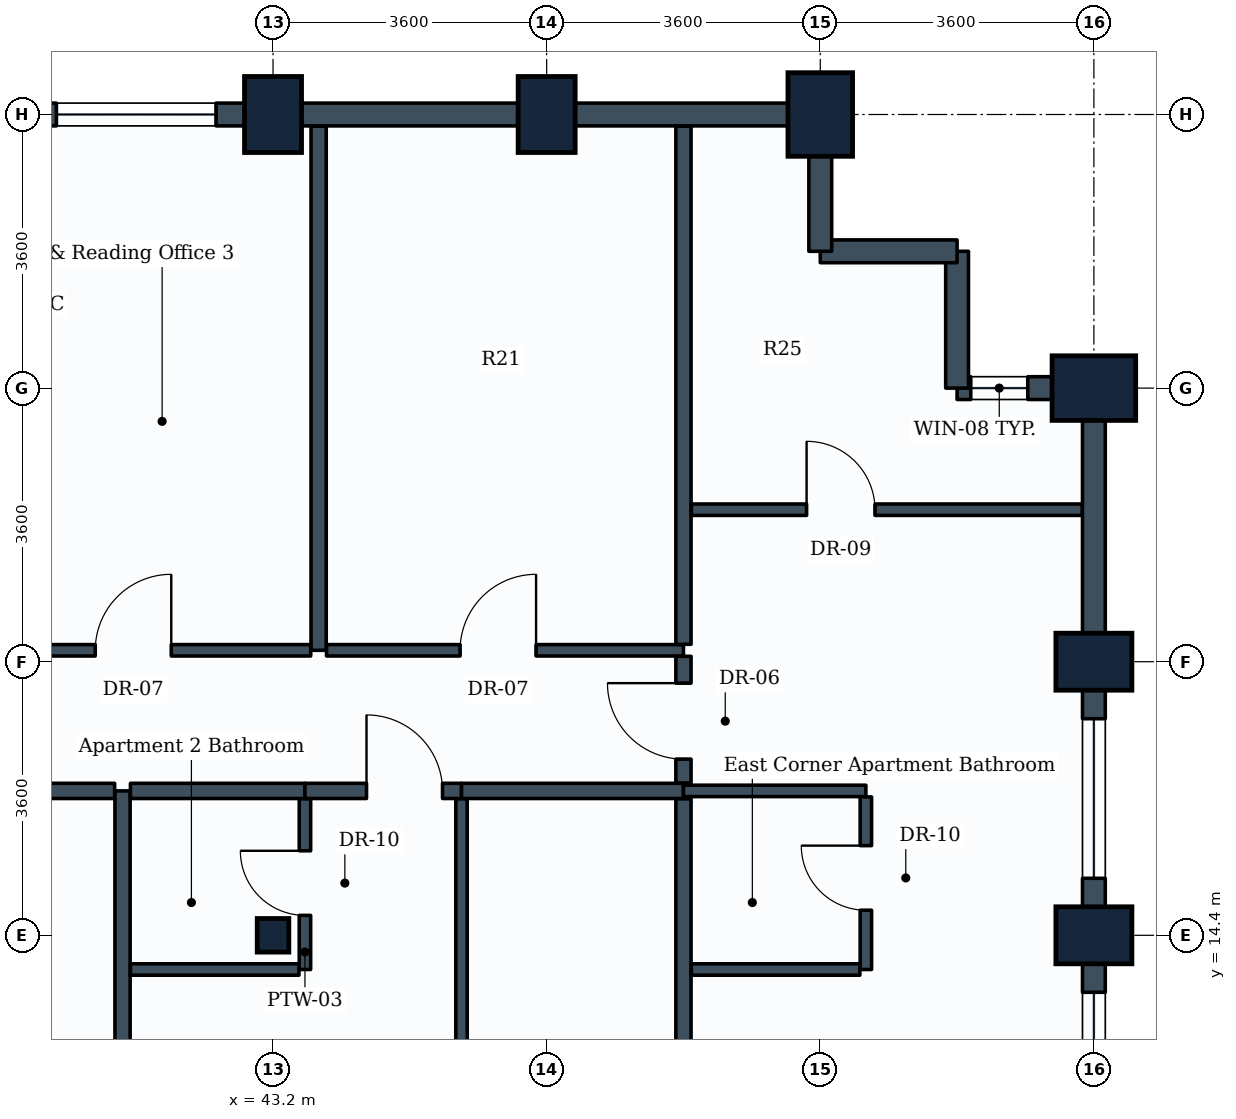
"""IFC4 building model, lengths in metres.
Left out: names, types, materials, properties, quantities, classifications, styles, units other than length and angle.
Written with IfcOpenShell. Run it as: python <this file> out.ifc"""

import sys

from ifc_helpers import new_model, si_unit, direction, frame, frame_2d, origin, origin_2d, place, context, subcontext, project, spatial, rectangle, i_section, extrude, element, fill, save


model = new_model("IFC4")
c1 = context("Model", 3, precision=1e-05, world=origin(), true_north=direction((0.0, 1.0)))
c2 = subcontext(c1, "Body", "Model", "MODEL_VIEW")
j1 = project(units=[si_unit("LENGTHUNIT", "METRE"), si_unit("PLANEANGLEUNIT", "RADIAN")], contexts=[c1])
p1 = place(None, origin())
s1 = spatial("IfcSite", under=j1, at=p1, CompositionType="ELEMENT")
p2 = place(p1, origin())
s2 = spatial("IfcBuilding", under=s1, at=p2, CompositionType="ELEMENT")
p3 = place(p2, frame((0.0, 0.0, 139.0)))
s3 = spatial("IfcBuildingStorey", under=s2, at=p3, CompositionType="ELEMENT", Elevation=139.0)
p4 = place(p3, frame((43.2, 14.4, 0.0), z_axis=(0.0, 0.0, 1.0), x_axis=(1.0, 0.0, 0.0)))
e1 = element("IfcColumn", 1, at=p4, inside=s3, PredefinedType="COLUMN", context=c2, shape_type="SweptSolid", body=[
    extrude(i_section(OverallWidth=0.416, OverallDepth=0.442, WebThickness=0.025, FlangeThickness=0.041, FilletRadius=0.015, at=origin_2d()), origin(), (0.0, 0.0, 1.0), 3.8),
])
for number, where, z_axis, x_axis in (
    (2, (43.2, 25.2, 0.0), (0.0, 0.0, 1.0), (1.0, 0.0, 0.0)),
    (3, (46.8, 25.2, 0.0), (0.0, 0.0, 1.0), (1.0, 0.0, 0.0)),
):
    element("IfcColumn", number, at=place(p3, frame(where, z_axis=z_axis, x_axis=x_axis)), inside=s3, PredefinedType="COLUMN", context=c2, shape_type="SweptSolid", body=[
        extrude(rectangle(XDim=0.75, YDim=1.0, at=origin_2d()), origin(), (0.0, 0.0, 1.0), 3.8),
    ])
p5 = place(p3, frame((50.4, 25.2, 0.0), z_axis=(0.0, 0.0, 1.0), x_axis=(1.0, 0.0, 0.0)))
e4 = element("IfcColumn", 4, at=p5, inside=s3, PredefinedType="COLUMN", context=c2, shape_type="SweptSolid", body=[
    extrude(rectangle(XDim=0.85, YDim=1.1, at=origin_2d()), origin(), (0.0, 0.0, 1.0), 3.8),
])
for number, where, z_axis, x_axis in (
    (5, (54.0, 14.4, 0.0), (0.0, 0.0, 1.0), (0.0, 1.0, 0.0)),
    (6, (54.0, 18.0, 0.0), (0.0, 0.0, 1.0), (0.0, 1.0, 0.0)),
):
    element("IfcColumn", number, at=place(p3, frame(where, z_axis=z_axis, x_axis=x_axis)), inside=s3, PredefinedType="COLUMN", context=c2, shape_type="SweptSolid", body=[
        extrude(rectangle(XDim=0.75, YDim=1.0, at=origin_2d()), origin(), (0.0, 0.0, 1.0), 3.8),
    ])
p6 = place(p3, frame((54.0, 21.6, 0.0), z_axis=(0.0, 0.0, 1.0), x_axis=(0.0, 1.0, 0.0)))
e7 = element("IfcColumn", 7, at=p6, inside=s3, PredefinedType="COLUMN", context=c2, shape_type="SweptSolid", body=[
    extrude(rectangle(XDim=0.85, YDim=1.1, at=origin_2d()), origin(), (0.0, 0.0, 1.0), 3.8),
])
p7 = place(p3, frame((54.0, 14.4, 0.0), z_axis=(0.0, 0.0, 1.0), x_axis=(0.0, -1.0, 0.0)))
e8 = element("IfcWall", 8, at=p7, inside=s3, PredefinedType="STANDARD", context=c2, shape_type="SweptSolid", body=[
    extrude(rectangle(XDim=3.6, YDim=0.3, at=frame_2d((1.8, 0.0))), origin(), (0.0, 0.0, 1.0), 2.93),
])
p8 = place(p7, frame((0.75, 0.0, 0.85)))
e9 = element("IfcOpeningElement", 9, at=p8, cuts=e8, PredefinedType="OPENING", context=c2, shape_type="SweptSolid", body=[
    extrude(rectangle(XDim=2.1, YDim=1.35, at=frame_2d((1.05, 0.675))), frame((0.0, 0.16, 0.0), z_axis=(0.0, -1.0, 0.0), x_axis=(1.0, 0.0, 0.0)), (0.0, 0.0, 1.0), 0.32),
])
p9 = place(p3, frame((54.0, 18.0, 0.0), z_axis=(0.0, 0.0, 1.0), x_axis=(0.0, -1.0, 0.0)))
e10 = element("IfcWall", 10, at=p9, inside=s3, PredefinedType="STANDARD", context=c2, shape_type="SweptSolid", body=[
    extrude(rectangle(XDim=3.6, YDim=0.3, at=frame_2d((1.8, 0.0))), origin(), (0.0, 0.0, 1.0), 2.93),
])
p10 = place(p9, frame((0.75, 0.0, 0.85)))
e11 = element("IfcOpeningElement", 11, at=p10, cuts=e10, PredefinedType="OPENING", context=c2, shape_type="SweptSolid", body=[
    extrude(rectangle(XDim=2.1, YDim=1.35, at=frame_2d((1.05, 0.675))), frame((0.0, 0.16, 0.0), z_axis=(0.0, -1.0, 0.0), x_axis=(1.0, 0.0, 0.0)), (0.0, 0.0, 1.0), 0.32),
])
p11 = place(p3, frame((54.0, 21.6, 0.0), z_axis=(0.0, 0.0, 1.0), x_axis=(0.0, -1.0, 0.0)))
e12 = element("IfcWall", 12, at=p11, inside=s3, PredefinedType="STANDARD", context=c2, shape_type="SweptSolid", body=[
    extrude(rectangle(XDim=3.6, YDim=0.3, at=frame_2d((1.8, 0.0))), origin(), (0.0, 0.0, 1.0), 2.93),
])
p12 = place(p3, frame((52.2, 21.6, 0.0), z_axis=(0.0, 0.0, 1.0), x_axis=(1.0, 0.0, 0.0)))
e13 = element("IfcWall", 13, at=p12, inside=s3, PredefinedType="STANDARD", context=c2, shape_type="SweptSolid", body=[
    extrude(rectangle(XDim=1.8, YDim=0.3, at=frame_2d((0.9, 0.0))), origin(), (0.0, 0.0, 1.0), 2.93),
])
p13 = place(p12, frame((0.18, 0.0, 0.85)))
e14 = element("IfcOpeningElement", 14, at=p13, cuts=e13, PredefinedType="OPENING", context=c2, shape_type="SweptSolid", body=[
    extrude(rectangle(XDim=0.75, YDim=1.05, at=frame_2d((0.375, 0.525))), frame((0.0, 0.16, 0.0), z_axis=(0.0, -1.0, 0.0), x_axis=(1.0, 0.0, 0.0)), (0.0, 0.0, 1.0), 0.32),
])
p14 = place(p3, frame((52.2, 23.4, 0.0), z_axis=(0.0, 0.0, 1.0), x_axis=(0.0, -1.0, 0.0)))
e15 = element("IfcWall", 15, at=p14, inside=s3, PredefinedType="STANDARD", context=c2, shape_type="SweptSolid", body=[
    extrude(rectangle(XDim=1.8, YDim=0.3, at=frame_2d((0.9, 0.0))), origin(), (0.0, 0.0, 1.0), 3.535),
])
p15 = place(p3, frame((50.4, 23.4, 0.0), z_axis=(0.0, 0.0, 1.0), x_axis=(1.0, 0.0, 0.0)))
e16 = element("IfcWall", 16, at=p15, inside=s3, PredefinedType="STANDARD", context=c2, shape_type="SweptSolid", body=[
    extrude(rectangle(XDim=1.8, YDim=0.3, at=frame_2d((0.9, 0.0))), origin(), (0.0, 0.0, 1.0), 3.535),
])
p16 = place(p3, frame((50.4, 25.2, 0.0), z_axis=(0.0, 0.0, 1.0), x_axis=(0.0, -1.0, 0.0)))
e17 = element("IfcWall", 17, at=p16, inside=s3, PredefinedType="STANDARD", context=c2, shape_type="SweptSolid", body=[
    extrude(rectangle(XDim=1.8, YDim=0.3, at=frame_2d((0.9, 0.0))), origin(), (0.0, 0.0, 1.0), 2.93),
])
p17 = place(p3, frame((46.8, 25.2, 0.0), z_axis=(0.0, 0.0, 1.0), x_axis=(1.0, 0.0, 0.0)))
e18 = element("IfcWall", 18, at=p17, inside=s3, PredefinedType="STANDARD", context=c2, shape_type="SweptSolid", body=[
    extrude(rectangle(XDim=3.6, YDim=0.3, at=frame_2d((1.8, 0.0))), origin(), (0.0, 0.0, 1.0), 2.93),
])
p18 = place(p3, frame((43.2, 25.2, 0.0), z_axis=(0.0, 0.0, 1.0), x_axis=(1.0, 0.0, 0.0)))
e19 = element("IfcWall", 19, at=p18, inside=s3, PredefinedType="STANDARD", context=c2, shape_type="SweptSolid", body=[
    extrude(rectangle(XDim=3.6, YDim=0.3, at=frame_2d((1.8, 0.0))), origin(), (0.0, 0.0, 1.0), 2.93),
])
p19 = place(p3, frame((39.6, 25.2, 0.0), z_axis=(0.0, 0.0, 1.0), x_axis=(1.0, 0.0, 0.0)))
e20 = element("IfcWall", 20, at=p19, inside=s3, PredefinedType="STANDARD", context=c2, shape_type="SweptSolid", body=[
    extrude(rectangle(XDim=3.6, YDim=0.3, at=frame_2d((1.8, 0.0))), origin(), (0.0, 0.0, 1.0), 2.93),
])
p20 = place(p19, frame((0.75, 0.0, 0.85)))
e21 = element("IfcOpeningElement", 21, at=p20, cuts=e20, PredefinedType="OPENING", context=c2, shape_type="SweptSolid", body=[
    extrude(rectangle(XDim=2.1, YDim=1.35, at=frame_2d((1.05, 0.675))), frame((0.0, 0.16, 0.0), z_axis=(0.0, -1.0, 0.0), x_axis=(1.0, 0.0, 0.0)), (0.0, 0.0, 1.0), 0.32),
])
p21 = place(p3, frame((41.22, 5.7, 0.0), z_axis=(0.0, 0.0, 1.0), x_axis=(0.0, 1.0, 0.0)))
e22 = element("IfcWall", 22, at=p21, inside=s3, PredefinedType="PARTITIONING", context=c2, shape_type="SweptSolid", body=[
    extrude(rectangle(XDim=10.6, YDim=0.2, at=frame_2d((5.3, 0.0))), origin(), (0.0, 0.0, 1.0), 3.13),
])
p22 = place(p3, frame((36.8, 16.3, 0.0), z_axis=(0.0, 0.0, 1.0), x_axis=(1.0, 0.0, 0.0)))
e23 = element("IfcWall", 23, at=p22, inside=s3, PredefinedType="PARTITIONING", context=c2, shape_type="SweptSolid", body=[
    extrude(rectangle(XDim=4.316, YDim=0.2, at=frame_2d((2.158, 0.0))), origin(), (0.0, 0.0, 1.0), 3.17),
])
p23 = place(p22, frame((1.71, 0.0, 0.0)))
e24 = element("IfcOpeningElement", 24, at=p23, cuts=e23, PredefinedType="OPENING", context=c2, shape_type="SweptSolid", body=[
    extrude(rectangle(XDim=1.0, YDim=2.1, at=frame_2d((0.5, 1.05))), frame((0.0, 0.11, 0.0), z_axis=(0.0, -1.0, 0.0), x_axis=(1.0, 0.0, 0.0)), (0.0, 0.0, 1.0), 0.22),
])
p24 = place(p3, frame((41.324, 16.3, 0.0), z_axis=(0.0, 0.0, 1.0), x_axis=(1.0, 0.0, 0.0)))
e25 = element("IfcWall", 25, at=p24, inside=s3, PredefinedType="PARTITIONING", context=c2, shape_type="SweptSolid", body=[
    extrude(rectangle(XDim=2.296, YDim=0.2, at=frame_2d((1.148, 0.0))), origin(), (0.0, 0.0, 1.0), 3.18),
])
p25 = place(p3, frame((43.62, 13.95, 0.0), z_axis=(0.0, 0.0, 1.0), x_axis=(0.0, 1.0, 0.0)))
e26 = element("IfcWall", 26, at=p25, inside=s3, PredefinedType="PARTITIONING", context=c2, shape_type="SweptSolid", body=[
    extrude(rectangle(XDim=2.246, YDim=0.15, at=frame_2d((1.123, 0.0))), origin(), (0.0, 0.0, 1.0), 3.17),
])
p26 = place(p25, frame((0.712, 0.0, 0.0)))
e27 = element("IfcOpeningElement", 27, at=p26, cuts=e26, PredefinedType="OPENING", context=c2, shape_type="SweptSolid", body=[
    extrude(rectangle(XDim=0.85, YDim=2.1, at=frame_2d((0.425, 1.05))), frame((0.0, 0.085, 0.0), z_axis=(0.0, -1.0, 0.0), x_axis=(1.0, 0.0, 0.0)), (0.0, 0.0, 1.0), 0.17),
])
p27 = place(p3, frame((41.324, 13.95, 0.0), z_axis=(0.0, 0.0, 1.0), x_axis=(1.0, 0.0, 0.0)))
e28 = element("IfcWall", 28, at=p27, inside=s3, PredefinedType="PARTITIONING", context=c2, shape_type="SweptSolid", body=[
    extrude(rectangle(XDim=2.217, YDim=0.15, at=frame_2d((1.108, 0.0))), origin(), (0.0, 0.0, 1.0), 3.18),
])
p28 = place(p3, frame((43.62, 16.3, 0.0), z_axis=(0.0, 0.0, 1.0), x_axis=(1.0, 0.0, 0.0)))
e29 = element("IfcWall", 29, at=p28, inside=s3, PredefinedType="PARTITIONING", context=c2, shape_type="SweptSolid", body=[
    extrude(rectangle(XDim=2.06, YDim=0.2, at=frame_2d((1.03, 0.0))), origin(), (0.0, 0.0, 1.0), 3.535),
])
p29 = place(p28, frame((0.81, 0.0, 0.0)))
e30 = element("IfcOpeningElement", 30, at=p29, cuts=e29, PredefinedType="OPENING", context=c2, shape_type="SweptSolid", body=[
    extrude(rectangle(XDim=1.0, YDim=2.1, at=frame_2d((0.5, 1.05))), frame((0.0, 0.11, 0.0), z_axis=(0.0, -1.0, 0.0), x_axis=(1.0, 0.0, 0.0)), (0.0, 0.0, 1.0), 0.22),
])
p30 = place(p3, frame((45.68, 16.3, 0.0), z_axis=(0.0, 0.0, 1.0), x_axis=(1.0, 0.0, 0.0)))
e31 = element("IfcWall", 31, at=p30, inside=s3, PredefinedType="PARTITIONING", context=c2, shape_type="SweptSolid", body=[
    extrude(rectangle(XDim=2.92, YDim=0.2, at=frame_2d((1.46, 0.0))), origin(), (0.0, 0.0, 1.0), 3.17),
])
p31 = place(p3, frame((45.68, 5.7, 0.0), z_axis=(0.0, 0.0, 1.0), x_axis=(0.0, 1.0, 0.0)))
e32 = element("IfcWall", 32, at=p31, inside=s3, PredefinedType="PARTITIONING", context=c2, shape_type="SweptSolid", body=[
    extrude(rectangle(XDim=10.496, YDim=0.15, at=frame_2d((5.248, 0.0))), origin(), (0.0, 0.0, 1.0), 3.17),
])
p32 = place(p31, frame((4.81, 0.0, 0.0)))
e33 = element("IfcOpeningElement", 33, at=p32, cuts=e32, PredefinedType="OPENING", context=c2, shape_type="SweptSolid", body=[
    extrude(rectangle(XDim=0.9, YDim=2.1, at=frame_2d((0.45, 1.05))), frame((0.0, 0.085, 0.0), z_axis=(0.0, -1.0, 0.0), x_axis=(1.0, 0.0, 0.0)), (0.0, 0.0, 1.0), 0.17),
])
p33 = place(p3, frame((43.8, 18.15, 0.0), z_axis=(0.0, 0.0, 1.0), x_axis=(0.0, 1.0, 0.0)))
e34 = element("IfcWall", 34, at=p33, inside=s3, PredefinedType="PARTITIONING", context=c2, shape_type="SweptSolid", body=[
    extrude(rectangle(XDim=6.896, YDim=0.2, at=frame_2d((3.448, 0.0))), origin(), (0.0, 0.0, 1.0), 2.93),
])
p34 = place(p3, frame((39.0, 18.15, 0.0), z_axis=(0.0, 0.0, 1.0), x_axis=(1.0, 0.0, 0.0)))
e35 = element("IfcWall", 35, at=p34, inside=s3, PredefinedType="PARTITIONING", context=c2, shape_type="SweptSolid", body=[
    extrude(rectangle(XDim=4.696, YDim=0.15, at=frame_2d((2.348, 0.0))), origin(), (0.0, 0.0, 1.0), 3.08),
])
p35 = place(p34, frame((1.861, 0.0, 0.0)))
e36 = element("IfcOpeningElement", 36, at=p35, cuts=e35, PredefinedType="OPENING", context=c2, shape_type="SweptSolid", body=[
    extrude(rectangle(XDim=1.0, YDim=2.1, at=frame_2d((0.5, 1.05))), frame((0.0, 0.085, 0.0), z_axis=(0.0, -1.0, 0.0), x_axis=(1.0, 0.0, 0.0)), (0.0, 0.0, 1.0), 0.17),
])
p36 = place(p3, frame((43.904, 18.15, 0.0), z_axis=(0.0, 0.0, 1.0), x_axis=(1.0, 0.0, 0.0)))
e37 = element("IfcWall", 37, at=p36, inside=s3, PredefinedType="PARTITIONING", context=c2, shape_type="SweptSolid", body=[
    extrude(rectangle(XDim=4.696, YDim=0.15, at=frame_2d((2.348, 0.0))), origin(), (0.0, 0.0, 1.0), 3.17),
])
p37 = place(p36, frame((1.757, 0.0, 0.0)))
e38 = element("IfcOpeningElement", 38, at=p37, cuts=e37, PredefinedType="OPENING", context=c2, shape_type="SweptSolid", body=[
    extrude(rectangle(XDim=1.0, YDim=2.1, at=frame_2d((0.5, 1.05))), frame((0.0, 0.085, 0.0), z_axis=(0.0, -1.0, 0.0), x_axis=(1.0, 0.0, 0.0)), (0.0, 0.0, 1.0), 0.17),
])
p38 = place(p3, frame((48.6, 5.7, 0.0), z_axis=(0.0, 0.0, 1.0), x_axis=(0.0, 1.0, 0.0)))
e39 = element("IfcWall", 39, at=p38, inside=s3, PredefinedType="PARTITIONING", context=c2, shape_type="SweptSolid", body=[
    extrude(rectangle(XDim=10.496, YDim=0.2, at=frame_2d((5.248, 0.0))), origin(), (0.0, 0.0, 1.0), 3.17),
])
p39 = place(p3, frame((48.6, 18.229, 0.0), z_axis=(0.0, 0.0, 1.0), x_axis=(0.0, 1.0, 0.0)))
e40 = element("IfcWall", 40, at=p39, inside=s3, PredefinedType="PARTITIONING", context=c2, shape_type="SweptSolid", body=[
    extrude(rectangle(XDim=6.817, YDim=0.2, at=frame_2d((3.408, 0.0))), origin(), (0.0, 0.0, 1.0), 2.93),
])
p40 = place(p3, frame((48.6, 16.404, 0.0), z_axis=(0.0, 0.0, 1.0), x_axis=(0.0, 1.0, 0.0)))
e41 = element("IfcWall", 41, at=p40, inside=s3, PredefinedType="PARTITIONING", context=c2, shape_type="SweptSolid", body=[
    extrude(rectangle(XDim=1.667, YDim=0.2, at=frame_2d((0.833, 0.0))), origin(), (0.0, 0.0, 1.0), 3.535),
])
p41 = place(p40, frame((0.314, 0.0, 0.0)))
e42 = element("IfcOpeningElement", 42, at=p41, cuts=e41, PredefinedType="OPENING", context=c2, shape_type="SweptSolid", body=[
    extrude(rectangle(XDim=1.0, YDim=2.1, at=frame_2d((0.5, 1.05))), frame((0.0, 0.11, 0.0), z_axis=(0.0, -1.0, 0.0), x_axis=(1.0, 0.0, 0.0)), (0.0, 0.0, 1.0), 0.22),
])
p42 = place(p3, frame((48.6, 16.3, 0.0), z_axis=(0.0, 0.0, 1.0), x_axis=(1.0, 0.0, 0.0)))
e43 = element("IfcWall", 43, at=p42, inside=s3, PredefinedType="PARTITIONING", context=c2, shape_type="SweptSolid", body=[
    extrude(rectangle(XDim=2.4, YDim=0.15, at=frame_2d((1.2, 0.0))), origin(), (0.0, 0.0, 1.0), 3.535),
])
p43 = place(p3, frame((51.0, 13.95, 0.0), z_axis=(0.0, 0.0, 1.0), x_axis=(0.0, 1.0, 0.0)))
e44 = element("IfcWall", 44, at=p43, inside=s3, PredefinedType="PARTITIONING", context=c2, shape_type="SweptSolid", body=[
    extrude(rectangle(XDim=2.271, YDim=0.15, at=frame_2d((1.135, 0.0))), origin(), (0.0, 0.0, 1.0), 3.17),
])
p44 = place(p43, frame((0.78, 0.0, 0.0)))
e45 = element("IfcOpeningElement", 45, at=p44, cuts=e44, PredefinedType="OPENING", context=c2, shape_type="SweptSolid", body=[
    extrude(rectangle(XDim=0.85, YDim=2.1, at=frame_2d((0.425, 1.05))), frame((0.0, 0.085, 0.0), z_axis=(0.0, -1.0, 0.0), x_axis=(1.0, 0.0, 0.0)), (0.0, 0.0, 1.0), 0.17),
])
p45 = place(p3, frame((48.704, 13.95, 0.0), z_axis=(0.0, 0.0, 1.0), x_axis=(1.0, 0.0, 0.0)))
e46 = element("IfcWall", 46, at=p45, inside=s3, PredefinedType="PARTITIONING", context=c2, shape_type="SweptSolid", body=[
    extrude(rectangle(XDim=2.217, YDim=0.15, at=frame_2d((1.108, 0.0))), origin(), (0.0, 0.0, 1.0), 3.535),
])
p46 = place(p3, frame((48.704, 20.0, 0.0), z_axis=(0.0, 0.0, 1.0), x_axis=(1.0, 0.0, 0.0)))
e47 = element("IfcWall", 47, at=p46, inside=s3, PredefinedType="PARTITIONING", context=c2, shape_type="SweptSolid", body=[
    extrude(rectangle(XDim=5.142, YDim=0.15, at=frame_2d((2.571, 0.0))), origin(), (0.0, 0.0, 1.0), 2.93),
])
p47 = place(p46, frame((1.516, 0.0, 0.0)))
e48 = element("IfcOpeningElement", 48, at=p47, cuts=e47, PredefinedType="OPENING", context=c2, shape_type="SweptSolid", body=[
    extrude(rectangle(XDim=0.9, YDim=2.1, at=frame_2d((0.45, 1.05))), frame((0.0, 0.085, 0.0), z_axis=(0.0, -1.0, 0.0), x_axis=(1.0, 0.0, 0.0)), (0.0, 0.0, 1.0), 0.17),
])
p48 = place(p8, origin())
e49 = element("IfcWindow", 49, at=p48, inside=s3, PartitioningType="SINGLE_PANEL", PredefinedType="WINDOW", context=c2, shape_type="SweptSolid", body=[
    extrude(rectangle(XDim=2.1, YDim=1.35, at=frame_2d((1.05, 0.675))), frame((0.0, 0.03, 0.0), z_axis=(0.0, -1.0, 0.0), x_axis=(1.0, 0.0, 0.0)), (0.0, 0.0, 1.0), 0.06),
])
fill(e9, e49)
p49 = place(p10, origin())
e50 = element("IfcWindow", 50, at=p49, inside=s3, PartitioningType="SINGLE_PANEL", PredefinedType="WINDOW", context=c2, shape_type="SweptSolid", body=[
    extrude(rectangle(XDim=2.1, YDim=1.35, at=frame_2d((1.05, 0.675))), frame((0.0, 0.03, 0.0), z_axis=(0.0, -1.0, 0.0), x_axis=(1.0, 0.0, 0.0)), (0.0, 0.0, 1.0), 0.06),
])
fill(e11, e50)
p50 = place(p20, origin())
e51 = element("IfcWindow", 51, at=p50, inside=s3, PartitioningType="SINGLE_PANEL", PredefinedType="WINDOW", context=c2, shape_type="SweptSolid", body=[
    extrude(rectangle(XDim=2.1, YDim=1.35, at=frame_2d((1.05, 0.675))), frame((0.0, 0.03, 0.0), z_axis=(0.0, -1.0, 0.0), x_axis=(1.0, 0.0, 0.0)), (0.0, 0.0, 1.0), 0.06),
])
fill(e21, e51)
p51 = place(p26, origin())
e52 = element("IfcDoor", 52, at=p51, inside=s3, OperationType="SINGLE_SWING_RIGHT", PredefinedType="DOOR", context=c2, shape_type="SweptSolid", body=[
    extrude(rectangle(XDim=0.85, YDim=2.1, at=frame_2d((0.425, 1.05))), frame((0.0, 0.025, 0.0), z_axis=(0.0, -1.0, 0.0), x_axis=(1.0, 0.0, 0.0)), (0.0, 0.0, 1.0), 0.05),
])
fill(e27, e52)
p52 = place(p29, origin())
e53 = element("IfcDoor", 53, at=p52, inside=s3, OperationType="SINGLE_SWING_LEFT", PredefinedType="DOOR", context=c2, shape_type="SweptSolid", body=[
    extrude(rectangle(XDim=1.0, YDim=2.1, at=frame_2d((0.5, 1.05))), frame((0.0, 0.025, 0.0), z_axis=(0.0, -1.0, 0.0), x_axis=(1.0, 0.0, 0.0)), (0.0, 0.0, 1.0), 0.05),
])
fill(e30, e53)
p53 = place(p35, origin())
e54 = element("IfcDoor", 54, at=p53, inside=s3, OperationType="SINGLE_SWING_RIGHT", PredefinedType="DOOR", context=c2, shape_type="SweptSolid", body=[
    extrude(rectangle(XDim=1.0, YDim=2.1, at=frame_2d((0.5, 1.05))), frame((0.0, 0.025, 0.0), z_axis=(0.0, -1.0, 0.0), x_axis=(1.0, 0.0, 0.0)), (0.0, 0.0, 1.0), 0.05),
])
fill(e36, e54)
p54 = place(p37, origin())
e55 = element("IfcDoor", 55, at=p54, inside=s3, OperationType="SINGLE_SWING_RIGHT", PredefinedType="DOOR", context=c2, shape_type="SweptSolid", body=[
    extrude(rectangle(XDim=1.0, YDim=2.1, at=frame_2d((0.5, 1.05))), frame((0.0, 0.025, 0.0), z_axis=(0.0, -1.0, 0.0), x_axis=(1.0, 0.0, 0.0)), (0.0, 0.0, 1.0), 0.05),
])
fill(e38, e55)
p55 = place(p41, origin())
e56 = element("IfcDoor", 56, at=p55, inside=s3, OperationType="SINGLE_SWING_RIGHT", PredefinedType="DOOR", context=c2, shape_type="SweptSolid", body=[
    extrude(rectangle(XDim=1.0, YDim=2.1, at=frame_2d((0.5, 1.05))), frame((0.0, 0.025, 0.0), z_axis=(0.0, -1.0, 0.0), x_axis=(1.0, 0.0, 0.0)), (0.0, 0.0, 1.0), 0.05),
])
fill(e42, e56)
p56 = place(p44, origin())
e57 = element("IfcDoor", 57, at=p56, inside=s3, OperationType="SINGLE_SWING_RIGHT", PredefinedType="DOOR", context=c2, shape_type="SweptSolid", body=[
    extrude(rectangle(XDim=0.85, YDim=2.1, at=frame_2d((0.425, 1.05))), frame((0.0, 0.025, 0.0), z_axis=(0.0, -1.0, 0.0), x_axis=(1.0, 0.0, 0.0)), (0.0, 0.0, 1.0), 0.05),
])
fill(e45, e57)
p57 = place(p47, origin())
e58 = element("IfcDoor", 58, at=p57, inside=s3, OperationType="SINGLE_SWING_LEFT", PredefinedType="DOOR", context=c2, shape_type="SweptSolid", body=[
    extrude(rectangle(XDim=0.9, YDim=2.1, at=frame_2d((0.45, 1.05))), frame((0.0, 0.025, 0.0), z_axis=(0.0, -1.0, 0.0), x_axis=(1.0, 0.0, 0.0)), (0.0, 0.0, 1.0), 0.05),
])
fill(e48, e58)
p58 = place(p13, origin())
e59 = element("IfcWindow", 59, at=p58, inside=s3, PartitioningType="SINGLE_PANEL", PredefinedType="WINDOW", context=c2, shape_type="SweptSolid", body=[
    extrude(rectangle(XDim=0.75, YDim=1.05, at=frame_2d((0.375, 0.525))), frame((0.0, 0.03, 0.0), z_axis=(0.0, -1.0, 0.0), x_axis=(1.0, 0.0, 0.0)), (0.0, 0.0, 1.0), 0.06),
])
fill(e14, e59)
save(model, sys.argv[1])
